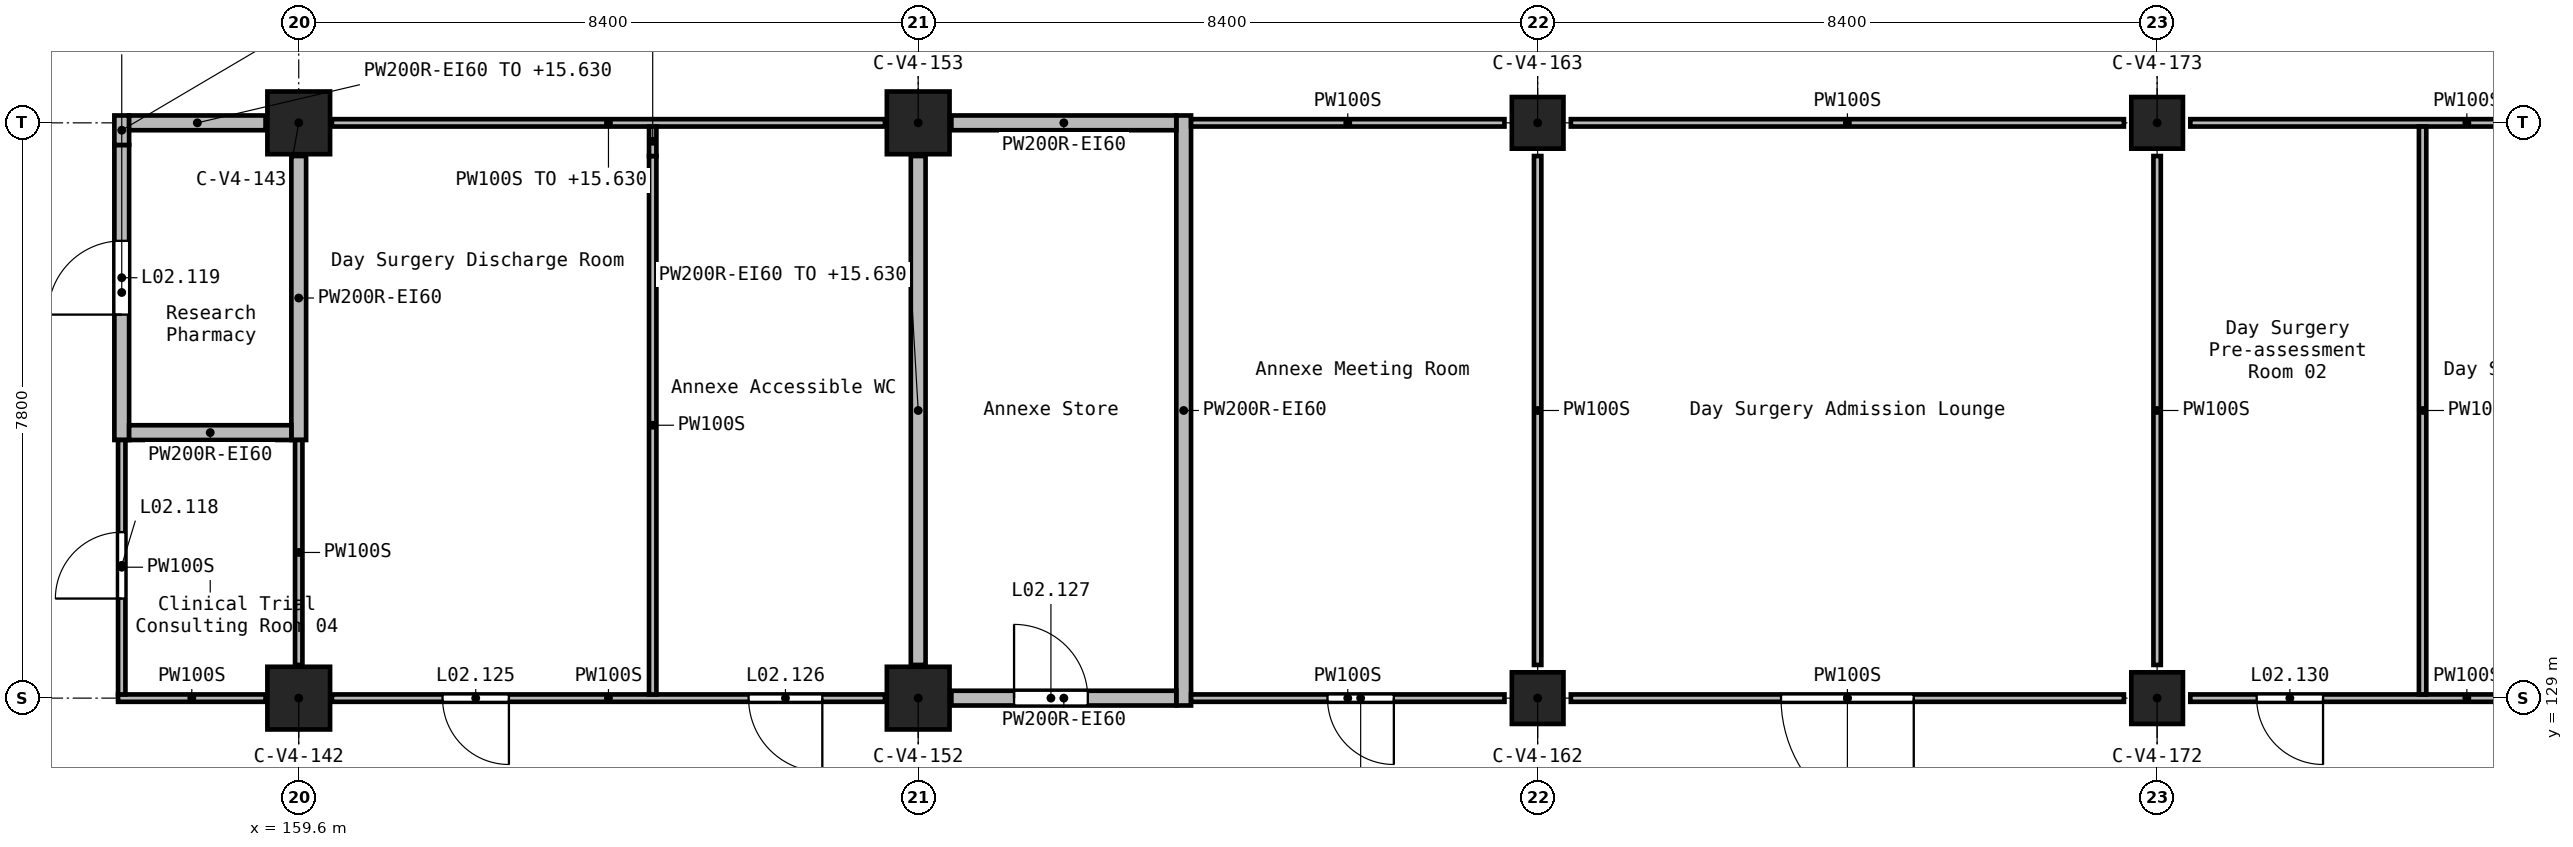
"""IFC4 building model, lengths in metres.
Left out: names, types, materials, properties, quantities, classifications, styles, units other than length and angle.
Written with IfcOpenShell. Run it as: python <this file> out.ifc"""

import sys

from ifc_helpers import new_model, si_unit, direction, frame, frame_2d, origin, origin_2d, place, context, subcontext, project, spatial, rectangle, extrude, element, fill, save


model = new_model("IFC4")
c1 = context("Model", 3, precision=1e-05, world=origin(), true_north=direction((0.0, 1.0)))
c2 = subcontext(c1, "Body", "Model", "MODEL_VIEW")
j1 = project(units=[si_unit("LENGTHUNIT", "METRE"), si_unit("PLANEANGLEUNIT", "RADIAN")], contexts=[c1])
p1 = place(None, origin())
s1 = spatial("IfcSite", under=j1, at=p1, CompositionType="ELEMENT")
p2 = place(p1, origin())
s2 = spatial("IfcBuilding", under=s1, at=p2, CompositionType="ELEMENT")
p3 = place(p2, frame((0.0, 0.0, 12.6)))
s3 = spatial("IfcBuildingStorey", under=s2, at=p3, CompositionType="ELEMENT", Elevation=12.6)
for number, where, z_axis, x_axis in (
    (1, (159.6, 129.0, 0.0), (0.0, 0.0, 1.0), (1.0, 0.0, 0.0)),
    (2, (159.6, 136.8, 0.0), (0.0, 0.0, 1.0), (1.0, 0.0, 0.0)),
    (3, (168.0, 129.0, 0.0), (0.0, 0.0, 1.0), (1.0, 0.0, 0.0)),
    (4, (168.0, 136.8, 0.0), (0.0, 0.0, 1.0), (1.0, 0.0, 0.0)),
):
    element("IfcColumn", number, at=place(p3, frame(where, z_axis=z_axis, x_axis=x_axis)), inside=s3, PredefinedType="COLUMN", context=c2, shape_type="SweptSolid", body=[
        extrude(rectangle(XDim=0.85, YDim=0.85, at=origin_2d()), origin(), (0.0, 0.0, 1.0), 4.2),
    ])
for number, where, z_axis, x_axis in (
    (5, (176.4, 129.0, 0.0), (0.0, 0.0, 1.0), (1.0, 0.0, 0.0)),
    (6, (176.4, 136.8, 0.0), (0.0, 0.0, 1.0), (1.0, 0.0, 0.0)),
    (7, (184.8, 129.0, 0.0), (0.0, 0.0, 1.0), (1.0, 0.0, 0.0)),
    (8, (184.8, 136.8, 0.0), (0.0, 0.0, 1.0), (1.0, 0.0, 0.0)),
):
    element("IfcColumn", number, at=place(p3, frame(where, z_axis=z_axis, x_axis=x_axis)), inside=s3, PredefinedType="COLUMN", context=c2, shape_type="SweptSolid", body=[
        extrude(rectangle(XDim=0.7, YDim=0.7, at=origin_2d()), origin(), (0.0, 0.0, 1.0), 4.2),
    ])
p4 = place(p3, frame((168.0, 129.45, 0.0), z_axis=(0.0, 0.0, 1.0), x_axis=(0.0, 1.0, 0.0)))
e9 = element("IfcWall", 9, at=p4, inside=s3, PredefinedType="SOLIDWALL", context=c2, shape_type="SweptSolid", body=[
    extrude(rectangle(XDim=6.9, YDim=0.2, at=frame_2d((3.45, 0.0))), origin(), (0.0, 0.0, 1.0), 3.03),
])
p5 = place(p3, frame((171.6, 128.9, 0.0), z_axis=(0.0, 0.0, 1.0), x_axis=(0.0, 1.0, 0.0)))
e10 = element("IfcWall", 10, at=p5, inside=s3, PredefinedType="SOLIDWALL", context=c2, shape_type="SweptSolid", body=[
    extrude(rectangle(XDim=8.0, YDim=0.2, at=frame_2d((4.0, 0.0))), origin(), (0.0, 0.0, 1.0), 3.85),
])
p6 = place(p3, frame((157.2, 132.5, 0.0), z_axis=(0.0, 0.0, 1.0), x_axis=(0.0, 1.0, 0.0)))
e11 = element("IfcWall", 11, at=p6, inside=s3, PredefinedType="SOLIDWALL", context=c2, shape_type="SweptSolid", body=[
    extrude(rectangle(XDim=4.0, YDim=0.2, at=frame_2d((2.0, 0.0))), origin(), (0.0, 0.0, 1.0), 3.08),
])
p7 = place(p6, frame((1.7, 0.0, 0.0)))
e12 = element("IfcOpeningElement", 12, at=p7, cuts=e11, PredefinedType="OPENING", context=c2, shape_type="SweptSolid", body=[
    extrude(rectangle(XDim=1.0, YDim=2.1, at=frame_2d((0.5, 1.05))), frame((0.0, 0.11, 0.0), z_axis=(0.0, -1.0, 0.0), x_axis=(1.0, 0.0, 0.0)), (0.0, 0.0, 1.0), 0.22),
])
p8 = place(p3, frame((157.2, 136.5, 0.0), z_axis=(0.0, 0.0, 1.0), x_axis=(0.0, 1.0, 0.0)))
e13 = element("IfcWall", 13, at=p8, inside=s3, PredefinedType="SOLIDWALL", context=c2, shape_type="SweptSolid", body=[
    extrude(rectangle(XDim=0.4, YDim=0.2, at=frame_2d((0.2, 0.0))), origin(), (0.0, 0.0, 1.0), 3.03),
])
p9 = place(p3, frame((159.6, 132.5, 0.0), z_axis=(0.0, 0.0, 1.0), x_axis=(0.0, 1.0, 0.0)))
e14 = element("IfcWall", 14, at=p9, inside=s3, PredefinedType="SOLIDWALL", context=c2, shape_type="SweptSolid", body=[
    extrude(rectangle(XDim=3.85, YDim=0.2, at=frame_2d((1.925, 0.0))), origin(), (0.0, 0.0, 1.0), 3.85),
])
p10 = place(p3, frame((168.45, 129.0, 0.0), z_axis=(0.0, 0.0, 1.0), x_axis=(1.0, 0.0, 0.0)))
e15 = element("IfcWall", 15, at=p10, inside=s3, PredefinedType="SOLIDWALL", context=c2, shape_type="SweptSolid", body=[
    extrude(rectangle(XDim=3.05, YDim=0.2, at=frame_2d((1.525, 0.0))), origin(), (0.0, 0.0, 1.0), 3.85),
])
p11 = place(p10, frame((0.85, 0.0, 0.0)))
e16 = element("IfcOpeningElement", 16, at=p11, cuts=e15, PredefinedType="OPENING", context=c2, shape_type="SweptSolid", body=[
    extrude(rectangle(XDim=1.0, YDim=2.1, at=frame_2d((0.5, 1.05))), frame((0.0, 0.11, 0.0), z_axis=(0.0, -1.0, 0.0), x_axis=(1.0, 0.0, 0.0)), (0.0, 0.0, 1.0), 0.22),
])
p12 = place(p3, frame((168.45, 136.8, 0.0), z_axis=(0.0, 0.0, 1.0), x_axis=(1.0, 0.0, 0.0)))
e17 = element("IfcWall", 17, at=p12, inside=s3, PredefinedType="SOLIDWALL", context=c2, shape_type="SweptSolid", body=[
    extrude(rectangle(XDim=3.05, YDim=0.2, at=frame_2d((1.525, 0.0))), origin(), (0.0, 0.0, 1.0), 3.85),
])
p13 = place(p3, frame((157.3, 132.6, 0.0), z_axis=(0.0, 0.0, 1.0), x_axis=(1.0, 0.0, 0.0)))
e18 = element("IfcWall", 18, at=p13, inside=s3, PredefinedType="SOLIDWALL", context=c2, shape_type="SweptSolid", body=[
    extrude(rectangle(XDim=2.2, YDim=0.2, at=frame_2d((1.1, 0.0))), origin(), (0.0, 0.0, 1.0), 3.85),
])
p14 = place(p3, frame((157.3, 136.8, 0.0), z_axis=(0.0, 0.0, 1.0), x_axis=(1.0, 0.0, 0.0)))
e19 = element("IfcWall", 19, at=p14, inside=s3, PredefinedType="SOLIDWALL", context=c2, shape_type="SweptSolid", body=[
    extrude(rectangle(XDim=1.85, YDim=0.2, at=frame_2d((0.925, 0.0))), origin(), (0.0, 0.0, 1.0), 3.03),
])
p15 = place(p3, frame((192.75, 129.0, 0.0), z_axis=(0.0, 0.0, 1.0), x_axis=(-1.0, 0.0, 0.0)))
e20 = element("IfcWall", 20, at=p15, inside=s3, PredefinedType="PARTITIONING", context=c2, shape_type="SweptSolid", body=[
    extrude(rectangle(XDim=7.5, YDim=0.1, at=frame_2d((3.75, 0.0))), origin(), (0.0, 0.0, 1.0), 3.85),
])
p16 = place(p15, frame((5.7, 0.0, 0.0)))
e21 = element("IfcOpeningElement", 21, at=p16, cuts=e20, PredefinedType="OPENING", context=c2, shape_type="SweptSolid", body=[
    extrude(rectangle(XDim=0.9, YDim=2.1, at=frame_2d((0.45, 1.05))), frame((0.0, 0.06, 0.0), z_axis=(0.0, -1.0, 0.0), x_axis=(1.0, 0.0, 0.0)), (0.0, 0.0, 1.0), 0.12),
])
p17 = place(p15, frame((1.5, 0.0, 0.0)))
e22 = element("IfcOpeningElement", 22, at=p17, cuts=e20, PredefinedType="OPENING", context=c2, shape_type="SweptSolid", body=[
    extrude(rectangle(XDim=0.9, YDim=2.1, at=frame_2d((0.45, 1.05))), frame((0.0, 0.06, 0.0), z_axis=(0.0, -1.0, 0.0), x_axis=(1.0, 0.0, 0.0)), (0.0, 0.0, 1.0), 0.12),
])
p18 = place(p3, frame((184.35, 129.0, 0.0), z_axis=(0.0, 0.0, 1.0), x_axis=(-1.0, 0.0, 0.0)))
e23 = element("IfcWall", 23, at=p18, inside=s3, PredefinedType="PARTITIONING", context=c2, shape_type="SweptSolid", body=[
    extrude(rectangle(XDim=7.5, YDim=0.1, at=frame_2d((3.75, 0.0))), origin(), (0.0, 0.0, 1.0), 3.85),
])
p19 = place(p18, frame((2.85, 0.0, 0.0)))
e24 = element("IfcOpeningElement", 24, at=p19, cuts=e23, PredefinedType="OPENING", context=c2, shape_type="SweptSolid", body=[
    extrude(rectangle(XDim=1.8, YDim=2.1, at=frame_2d((0.9, 1.05))), frame((0.0, 0.06, 0.0), z_axis=(0.0, -1.0, 0.0), x_axis=(1.0, 0.0, 0.0)), (0.0, 0.0, 1.0), 0.12),
])
p20 = place(p3, frame((175.95, 129.0, 0.0), z_axis=(0.0, 0.0, 1.0), x_axis=(-1.0, 0.0, 0.0)))
e25 = element("IfcWall", 25, at=p20, inside=s3, PredefinedType="PARTITIONING", context=c2, shape_type="SweptSolid", body=[
    extrude(rectangle(XDim=4.25, YDim=0.1, at=frame_2d((2.125, 0.0))), origin(), (0.0, 0.0, 1.0), 3.85),
])
p21 = place(p20, frame((1.5, 0.0, 0.0)))
e26 = element("IfcOpeningElement", 26, at=p21, cuts=e25, PredefinedType="OPENING", context=c2, shape_type="SweptSolid", body=[
    extrude(rectangle(XDim=0.9, YDim=2.1, at=frame_2d((0.45, 1.05))), frame((0.0, 0.06, 0.0), z_axis=(0.0, -1.0, 0.0), x_axis=(1.0, 0.0, 0.0)), (0.0, 0.0, 1.0), 0.12),
])
for number, where, z_axis, x_axis in (
    (27, (192.75, 136.8, 0.0), (0.0, 0.0, 1.0), (-1.0, 0.0, 0.0)),
    (28, (184.35, 136.8, 0.0), (0.0, 0.0, 1.0), (-1.0, 0.0, 0.0)),
):
    element("IfcWall", number, at=place(p3, frame(where, z_axis=z_axis, x_axis=x_axis)), inside=s3, PredefinedType="PARTITIONING", context=c2, shape_type="SweptSolid", body=[
        extrude(rectangle(XDim=7.5, YDim=0.1, at=frame_2d((3.75, 0.0))), origin(), (0.0, 0.0, 1.0), 3.85),
    ])
p22 = place(p3, frame((175.95, 136.8, 0.0), z_axis=(0.0, 0.0, 1.0), x_axis=(-1.0, 0.0, 0.0)))
e29 = element("IfcWall", 29, at=p22, inside=s3, PredefinedType="PARTITIONING", context=c2, shape_type="SweptSolid", body=[
    extrude(rectangle(XDim=4.25, YDim=0.1, at=frame_2d((2.125, 0.0))), origin(), (0.0, 0.0, 1.0), 3.85),
])
p23 = place(p3, frame((167.55, 129.0, 0.0), z_axis=(0.0, 0.0, 1.0), x_axis=(-1.0, 0.0, 0.0)))
e30 = element("IfcWall", 30, at=p23, inside=s3, PredefinedType="PARTITIONING", context=c2, shape_type="SweptSolid", body=[
    extrude(rectangle(XDim=7.5, YDim=0.1, at=frame_2d((3.75, 0.0))), origin(), (0.0, 0.0, 1.0), 3.85),
])
p24 = place(p23, frame((5.1, 0.0, 0.0)))
e31 = element("IfcOpeningElement", 31, at=p24, cuts=e30, PredefinedType="OPENING", context=c2, shape_type="SweptSolid", body=[
    extrude(rectangle(XDim=0.9, YDim=2.1, at=frame_2d((0.45, 1.05))), frame((0.0, 0.06, 0.0), z_axis=(0.0, -1.0, 0.0), x_axis=(1.0, 0.0, 0.0)), (0.0, 0.0, 1.0), 0.12),
])
p25 = place(p23, frame((0.85, 0.0, 0.0)))
e32 = element("IfcOpeningElement", 32, at=p25, cuts=e30, PredefinedType="OPENING", context=c2, shape_type="SweptSolid", body=[
    extrude(rectangle(XDim=1.0, YDim=2.1, at=frame_2d((0.5, 1.05))), frame((0.0, 0.06, 0.0), z_axis=(0.0, -1.0, 0.0), x_axis=(1.0, 0.0, 0.0)), (0.0, 0.0, 1.0), 0.12),
])
p26 = place(p3, frame((159.15, 129.0, 0.0), z_axis=(0.0, 0.0, 1.0), x_axis=(-1.0, 0.0, 0.0)))
e33 = element("IfcWall", 33, at=p26, inside=s3, PredefinedType="PARTITIONING", context=c2, shape_type="SweptSolid", body=[
    extrude(rectangle(XDim=2.0, YDim=0.1, at=frame_2d((1.0, 0.0))), origin(), (0.0, 0.0, 1.0), 3.85),
])
p27 = place(p3, frame((160.05, 136.8, 0.0), z_axis=(0.0, 0.0, 1.0), x_axis=(1.0, 0.0, 0.0)))
e34 = element("IfcWall", 34, at=p27, inside=s3, PredefinedType="PARTITIONING", context=c2, shape_type="SweptSolid", body=[
    extrude(rectangle(XDim=7.5, YDim=0.1, at=frame_2d((3.75, 0.0))), origin(), (0.0, 0.0, 1.0), 3.03),
])
p28 = place(p3, frame((164.4, 129.05, 0.0), z_axis=(0.0, 0.0, 1.0), x_axis=(0.0, 1.0, 0.0)))
e35 = element("IfcWall", 35, at=p28, inside=s3, PredefinedType="PARTITIONING", context=c2, shape_type="SweptSolid", body=[
    extrude(rectangle(XDim=7.3, YDim=0.1, at=frame_2d((3.65, 0.0))), origin(), (0.0, 0.0, 1.0), 3.85),
])
p29 = place(p3, frame((164.4, 136.35, 0.0), z_axis=(0.0, 0.0, 1.0), x_axis=(0.0, 1.0, 0.0)))
e36 = element("IfcWall", 36, at=p29, inside=s3, PredefinedType="PARTITIONING", context=c2, shape_type="SweptSolid", body=[
    extrude(rectangle(XDim=0.4, YDim=0.1, at=frame_2d((0.2, 0.0))), origin(), (0.0, 0.0, 1.0), 3.08),
])
for number, where, z_axis, x_axis in (
    (37, (176.4, 129.45, 0.0), (0.0, 0.0, 1.0), (0.0, 1.0, 0.0)),
    (38, (184.8, 129.45, 0.0), (0.0, 0.0, 1.0), (0.0, 1.0, 0.0)),
):
    element("IfcWall", number, at=place(p3, frame(where, z_axis=z_axis, x_axis=x_axis)), inside=s3, PredefinedType="PARTITIONING", context=c2, shape_type="SweptSolid", body=[
        extrude(rectangle(XDim=6.9, YDim=0.1, at=frame_2d((3.45, 0.0))), origin(), (0.0, 0.0, 1.0), 3.85),
    ])
p30 = place(p3, frame((188.4, 129.05, 0.0), z_axis=(0.0, 0.0, 1.0), x_axis=(0.0, 1.0, 0.0)))
e39 = element("IfcWall", 39, at=p30, inside=s3, PredefinedType="PARTITIONING", context=c2, shape_type="SweptSolid", body=[
    extrude(rectangle(XDim=7.7, YDim=0.1, at=frame_2d((3.85, 0.0))), origin(), (0.0, 0.0, 1.0), 3.85),
])
p31 = place(p3, frame((157.2, 129.05, 0.0), z_axis=(0.0, 0.0, 1.0), x_axis=(0.0, 1.0, 0.0)))
e40 = element("IfcWall", 40, at=p31, inside=s3, PredefinedType="PARTITIONING", context=c2, shape_type="SweptSolid", body=[
    extrude(rectangle(XDim=3.45, YDim=0.1, at=frame_2d((1.725, 0.0))), origin(), (0.0, 0.0, 1.0), 3.85),
])
p32 = place(p31, frame((1.3, 0.0, 0.0)))
e41 = element("IfcOpeningElement", 41, at=p32, cuts=e40, PredefinedType="OPENING", context=c2, shape_type="SweptSolid", body=[
    extrude(rectangle(XDim=0.9, YDim=2.1, at=frame_2d((0.45, 1.05))), frame((0.0, 0.06, 0.0), z_axis=(0.0, -1.0, 0.0), x_axis=(1.0, 0.0, 0.0)), (0.0, 0.0, 1.0), 0.12),
])
p33 = place(p3, frame((159.6, 129.45, 0.0), z_axis=(0.0, 0.0, 1.0), x_axis=(0.0, 1.0, 0.0)))
e42 = element("IfcWall", 42, at=p33, inside=s3, PredefinedType="PARTITIONING", context=c2, shape_type="SweptSolid", body=[
    extrude(rectangle(XDim=3.05, YDim=0.1, at=frame_2d((1.525, 0.0))), origin(), (0.0, 0.0, 1.0), 3.85),
])
p34 = place(p32, frame((0.9, 0.0, 0.0), z_axis=(0.0, 0.0, 1.0), x_axis=(-1.0, 0.0, 0.0)))
e43 = element("IfcDoor", 43, at=p34, inside=s3, OperationType="SINGLE_SWING_LEFT", PredefinedType="DOOR", context=c2, shape_type="SweptSolid", body=[
    extrude(rectangle(XDim=0.9, YDim=2.1, at=frame_2d((0.45, 1.05))), frame((0.0, 0.025, 0.0), z_axis=(0.0, -1.0, 0.0), x_axis=(1.0, 0.0, 0.0)), (0.0, 0.0, 1.0), 0.05),
])
fill(e41, e43)
p35 = place(p7, frame((1.0, 0.0, 0.0), z_axis=(0.0, 0.0, 1.0), x_axis=(-1.0, 0.0, 0.0)))
e44 = element("IfcDoor", 44, at=p35, inside=s3, OperationType="SINGLE_SWING_LEFT", PredefinedType="DOOR", context=c2, shape_type="SweptSolid", body=[
    extrude(rectangle(XDim=1.0, YDim=2.1, at=frame_2d((0.5, 1.05))), frame((0.0, 0.025, 0.0), z_axis=(0.0, -1.0, 0.0), x_axis=(1.0, 0.0, 0.0)), (0.0, 0.0, 1.0), 0.05),
])
fill(e12, e44)
p36 = place(p24, frame((0.9, 0.0, 0.0), z_axis=(0.0, 0.0, 1.0), x_axis=(-1.0, 0.0, 0.0)))
e45 = element("IfcDoor", 45, at=p36, inside=s3, OperationType="SINGLE_SWING_LEFT", PredefinedType="DOOR", context=c2, shape_type="SweptSolid", body=[
    extrude(rectangle(XDim=0.9, YDim=2.1, at=frame_2d((0.45, 1.05))), frame((0.0, 0.025, 0.0), z_axis=(0.0, -1.0, 0.0), x_axis=(1.0, 0.0, 0.0)), (0.0, 0.0, 1.0), 0.05),
])
fill(e31, e45)
p37 = place(p25, frame((1.0, 0.0, 0.0), z_axis=(0.0, 0.0, 1.0), x_axis=(-1.0, 0.0, 0.0)))
e46 = element("IfcDoor", 46, at=p37, inside=s3, OperationType="SINGLE_SWING_RIGHT", PredefinedType="DOOR", context=c2, shape_type="SweptSolid", body=[
    extrude(rectangle(XDim=1.0, YDim=2.1, at=frame_2d((0.5, 1.05))), frame((0.0, 0.025, 0.0), z_axis=(0.0, -1.0, 0.0), x_axis=(1.0, 0.0, 0.0)), (0.0, 0.0, 1.0), 0.05),
])
fill(e32, e46)
p38 = place(p11, origin())
e47 = element("IfcDoor", 47, at=p38, inside=s3, OperationType="SINGLE_SWING_LEFT", PredefinedType="DOOR", context=c2, shape_type="SweptSolid", body=[
    extrude(rectangle(XDim=1.0, YDim=2.1, at=frame_2d((0.5, 1.05))), frame((0.0, 0.025, 0.0), z_axis=(0.0, -1.0, 0.0), x_axis=(1.0, 0.0, 0.0)), (0.0, 0.0, 1.0), 0.05),
])
fill(e16, e47)
p39 = place(p21, frame((0.9, 0.0, 0.0), z_axis=(0.0, 0.0, 1.0), x_axis=(-1.0, 0.0, 0.0)))
e48 = element("IfcDoor", 48, at=p39, inside=s3, OperationType="SINGLE_SWING_RIGHT", PredefinedType="DOOR", context=c2, shape_type="SweptSolid", body=[
    extrude(rectangle(XDim=0.9, YDim=2.1, at=frame_2d((0.45, 1.05))), frame((0.0, 0.025, 0.0), z_axis=(0.0, -1.0, 0.0), x_axis=(1.0, 0.0, 0.0)), (0.0, 0.0, 1.0), 0.05),
])
fill(e26, e48)
p40 = place(p19, frame((1.8, 0.0, 0.0), z_axis=(0.0, 0.0, 1.0), x_axis=(-1.0, 0.0, 0.0)))
e49 = element("IfcDoor", 49, at=p40, inside=s3, OperationType="DOUBLE_DOOR_SINGLE_SWING", PredefinedType="DOOR", context=c2, shape_type="SweptSolid", body=[
    extrude(rectangle(XDim=1.8, YDim=2.1, at=frame_2d((0.9, 1.05))), frame((0.0, 0.025, 0.0), z_axis=(0.0, -1.0, 0.0), x_axis=(1.0, 0.0, 0.0)), (0.0, 0.0, 1.0), 0.05),
])
fill(e24, e49)
p41 = place(p16, frame((0.9, 0.0, 0.0), z_axis=(0.0, 0.0, 1.0), x_axis=(-1.0, 0.0, 0.0)))
e50 = element("IfcDoor", 50, at=p41, inside=s3, OperationType="SINGLE_SWING_LEFT", PredefinedType="DOOR", context=c2, shape_type="SweptSolid", body=[
    extrude(rectangle(XDim=0.9, YDim=2.1, at=frame_2d((0.45, 1.05))), frame((0.0, 0.025, 0.0), z_axis=(0.0, -1.0, 0.0), x_axis=(1.0, 0.0, 0.0)), (0.0, 0.0, 1.0), 0.05),
])
fill(e21, e50)
save(model, sys.argv[1])
